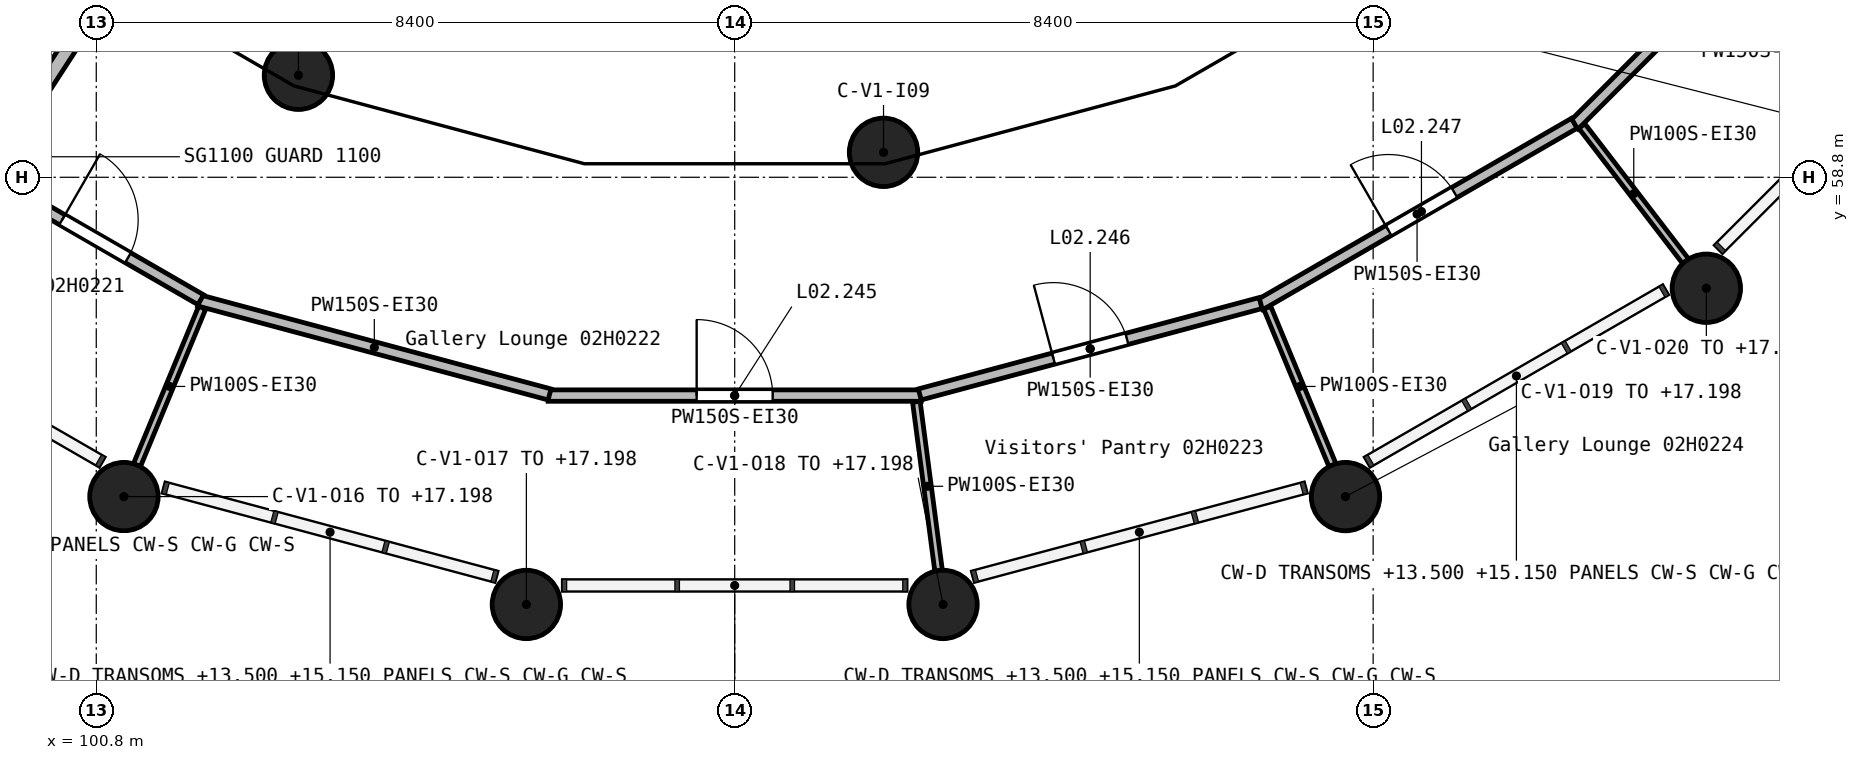
"""IFC4 building model, lengths in metres.
Left out: names, types, materials, properties, quantities, classifications, styles, units other than length and angle.
Written with IfcOpenShell. Run it as: python <this file> out.ifc"""

import sys

from ifc_helpers import new_model, si_unit, direction, frame, frame_2d, origin, origin_2d, place, context, subcontext, project, spatial, rectangle, circle, extrude, element, fill, save


model = new_model("IFC4")
c1 = context("Model", 3, precision=1e-05, world=origin(), true_north=direction((0.0, 1.0)))
c2 = subcontext(c1, "Body", "Model", "MODEL_VIEW")
j1 = project(units=[si_unit("LENGTHUNIT", "METRE"), si_unit("PLANEANGLEUNIT", "RADIAN")], contexts=[c1])
p1 = place(None, origin())
s1 = spatial("IfcSite", under=j1, at=p1, CompositionType="ELEMENT")
p2 = place(p1, origin())
s2 = spatial("IfcBuilding", under=s1, at=p2, CompositionType="ELEMENT")
p3 = place(p2, frame((0.0, 0.0, 12.6)))
s3 = spatial("IfcBuildingStorey", under=s2, at=p3, CompositionType="ELEMENT", Elevation=12.6)
p4 = place(p3, frame((101.164, 54.599, 0.0), z_axis=(0.0, 0.0, 1.0), x_axis=(1.0, 0.0, 0.0)))
e1 = element("IfcColumn", 1, at=p4, inside=s3, PredefinedType="COLUMN", context=c2, shape_type="SweptSolid", body=[
    extrude(circle(Radius=0.45, at=origin_2d()), origin(), (0.0, 0.0, 1.0), 4.598),
])
p5 = place(p3, frame((103.46, 60.142, 0.0), z_axis=(0.0, 0.0, 1.0), x_axis=(1.0, 0.0, 0.0)))
e2 = element("IfcColumn", 2, at=p5, inside=s3, PredefinedType="COLUMN", context=c2, shape_type="SweptSolid", body=[
    extrude(circle(Radius=0.45, at=origin_2d()), origin(), (0.0, 0.0, 1.0), 4.2),
])
p6 = place(p3, frame((106.459, 53.18, 0.0), z_axis=(0.0, 0.0, 1.0), x_axis=(1.0, 0.0, 0.0)))
e3 = element("IfcColumn", 3, at=p6, inside=s3, PredefinedType="COLUMN", context=c2, shape_type="SweptSolid", body=[
    extrude(circle(Radius=0.45, at=origin_2d()), origin(), (0.0, 0.0, 1.0), 4.598),
])
p7 = place(p3, frame((111.158, 59.128, 0.0), z_axis=(0.0, 0.0, 1.0), x_axis=(1.0, 0.0, 0.0)))
e4 = element("IfcColumn", 4, at=p7, inside=s3, PredefinedType="COLUMN", context=c2, shape_type="SweptSolid", body=[
    extrude(circle(Radius=0.45, at=origin_2d()), origin(), (0.0, 0.0, 1.0), 4.2),
])
for number, where, z_axis, x_axis in (
    (5, (111.941, 53.18, 0.0), (0.0, 0.0, 1.0), (1.0, 0.0, 0.0)),
    (6, (117.236, 54.599, 0.0), (0.0, 0.0, 1.0), (1.0, 0.0, 0.0)),
    (7, (121.984, 57.34, 0.0), (0.0, 0.0, 1.0), (1.0, 0.0, 0.0)),
):
    element("IfcColumn", number, at=place(p3, frame(where, z_axis=z_axis, x_axis=x_axis)), inside=s3, PredefinedType="COLUMN", context=c2, shape_type="SweptSolid", body=[
        extrude(circle(Radius=0.45, at=origin_2d()), origin(), (0.0, 0.0, 1.0), 4.598),
    ])
p8 = place(p3, frame((99.709, 59.386, 0.0), z_axis=(0.0, 0.0, 1.0), x_axis=(0.544553338247, 0.838726213853, 0.0)))
e8 = element("IfcWall", 8, at=p8, inside=s3, PredefinedType="SOLIDWALL", context=c2, shape_type="SweptSolid", body=[
    extrude(rectangle(XDim=2.525, YDim=0.2, at=frame_2d((1.263, 0.0))), origin(), (0.0, 0.0, 1.0), 3.85),
])
p9 = place(p3, frame((106.745, 55.928, 0.0), z_axis=(0.0, 0.0, 1.0), x_axis=(1.0, 0.0, 0.0)))
e9 = element("IfcWall", 9, at=p9, inside=s3, PredefinedType="PARTITIONING", context=c2, shape_type="SweptSolid", body=[
    extrude(rectangle(XDim=4.909, YDim=0.15, at=frame_2d((2.455, 0.0))), origin(), (0.0, 0.0, 1.0), 3.85),
])
p10 = place(p9, frame((1.955, 0.0, 0.0)))
e10 = element("IfcOpeningElement", 10, at=p10, cuts=e9, PredefinedType="OPENING", context=c2, shape_type="SweptSolid", body=[
    extrude(rectangle(XDim=1.0, YDim=2.1, at=frame_2d((0.5, 1.05))), frame((0.0, 0.085, 0.0), z_axis=(0.0, -1.0, 0.0), x_axis=(1.0, 0.0, 0.0)), (0.0, 0.0, 1.0), 0.17),
])
p11 = place(p3, frame((120.243, 59.486, 0.0), z_axis=(0.0, 0.0, 1.0), x_axis=(0.707131648229, 0.70708191327, 0.0)))
e11 = element("IfcWall", 11, at=p11, inside=s3, PredefinedType="PARTITIONING", context=c2, shape_type="SweptSolid", body=[
    extrude(rectangle(XDim=4.909, YDim=0.15, at=frame_2d((2.455, 0.0))), origin(), (0.0, 0.0, 1.0), 3.85),
])
p12 = place(p11, frame((1.954, 0.0, 0.0)))
e12 = element("IfcOpeningElement", 12, at=p12, cuts=e11, PredefinedType="OPENING", context=c2, shape_type="SweptSolid", body=[
    extrude(rectangle(XDim=1.0, YDim=2.1, at=frame_2d((0.5, 1.05))), frame((0.0, 0.085, 0.0), z_axis=(0.0, -1.0, 0.0), x_axis=(1.0, 0.0, 0.0)), (0.0, 0.0, 1.0), 0.17),
])
p13 = place(p3, frame((116.11, 57.123, 0.0), z_axis=(0.0, 0.0, 1.0), x_axis=(0.866054481515, 0.499949632511, 0.0)))
e13 = element("IfcWall", 13, at=p13, inside=s3, PredefinedType="PARTITIONING", context=c2, shape_type="SweptSolid", body=[
    extrude(rectangle(XDim=4.775, YDim=0.15, at=frame_2d((2.388, 0.0))), origin(), (0.0, 0.0, 1.0), 3.85),
])
p14 = place(p13, frame((1.954, 0.0, 0.0)))
e14 = element("IfcOpeningElement", 14, at=p14, cuts=e13, PredefinedType="OPENING", context=c2, shape_type="SweptSolid", body=[
    extrude(rectangle(XDim=1.0, YDim=2.1, at=frame_2d((0.5, 1.05))), frame((0.0, 0.085, 0.0), z_axis=(0.0, -1.0, 0.0), x_axis=(1.0, 0.0, 0.0)), (0.0, 0.0, 1.0), 0.17),
])
p15 = place(p3, frame((111.635, 55.943, 0.0), z_axis=(0.0, 0.0, 1.0), x_axis=(0.965901562331, 0.258909582454, 0.0)))
e15 = element("IfcWall", 15, at=p15, inside=s3, PredefinedType="PARTITIONING", context=c2, shape_type="SweptSolid", body=[
    extrude(rectangle(XDim=4.642, YDim=0.15, at=frame_2d((2.321, 0.0))), origin(), (0.0, 0.0, 1.0), 3.85),
])
p16 = place(p15, frame((1.821, 0.0, 0.0)))
e16 = element("IfcOpeningElement", 16, at=p16, cuts=e15, PredefinedType="OPENING", context=c2, shape_type="SweptSolid", body=[
    extrude(rectangle(XDim=1.0, YDim=2.1, at=frame_2d((0.5, 1.05))), frame((0.0, 0.085, 0.0), z_axis=(0.0, -1.0, 0.0), x_axis=(1.0, 0.0, 0.0)), (0.0, 0.0, 1.0), 0.17),
])
p17 = place(p3, frame((102.153, 57.179, 0.0), z_axis=(0.0, 0.0, 1.0), x_axis=(0.965887773881, -0.258961016886, 0.0)))
e17 = element("IfcWall", 17, at=p17, inside=s3, PredefinedType="PARTITIONING", context=c2, shape_type="SweptSolid", body=[
    extrude(rectangle(XDim=4.774, YDim=0.15, at=frame_2d((2.387, 0.0))), origin(), (0.0, 0.0, 1.0), 3.85),
])
p18 = place(p3, frame((99.499, 58.733, 0.0), z_axis=(0.0, 0.0, 1.0), x_axis=(0.866085584755, -0.499895749011, 0.0)))
e18 = element("IfcWall", 18, at=p18, inside=s3, PredefinedType="PARTITIONING", context=c2, shape_type="SweptSolid", body=[
    extrude(rectangle(XDim=3.09, YDim=0.15, at=frame_2d((1.545, 0.0))), origin(), (0.0, 0.0, 1.0), 3.85),
])
p19 = place(p18, frame((0.984, 0.0, 0.0)))
e19 = element("IfcOpeningElement", 19, at=p19, cuts=e18, PredefinedType="OPENING", context=c2, shape_type="SweptSolid", body=[
    extrude(rectangle(XDim=1.0, YDim=2.1, at=frame_2d((0.5, 1.05))), frame((0.0, 0.085, 0.0), z_axis=(0.0, -1.0, 0.0), x_axis=(1.0, 0.0, 0.0)), (0.0, 0.0, 1.0), 0.17),
])
p20 = place(p3, frame((120.346, 59.474, 0.0), z_axis=(0.0, 0.0, 1.0), x_axis=(0.608947804402, -0.793210294635, 0.0)))
e20 = element("IfcWall", 20, at=p20, inside=s3, PredefinedType="PARTITIONING", context=c2, shape_type="SweptSolid", body=[
    extrude(rectangle(XDim=2.243, YDim=0.1, at=frame_2d((1.122, 0.0))), origin(), (0.0, 0.0, 1.0), 3.85),
])
p21 = place(p3, frame((116.206, 57.084, 0.0), z_axis=(0.0, 0.0, 1.0), x_axis=(0.382829249812, -0.923819119465, 0.0)))
e21 = element("IfcWall", 21, at=p21, inside=s3, PredefinedType="PARTITIONING", context=c2, shape_type="SweptSolid", body=[
    extrude(rectangle(XDim=2.243, YDim=0.1, at=frame_2d((1.122, 0.0))), origin(), (0.0, 0.0, 1.0), 3.85),
])
p22 = place(p3, frame((101.335, 55.012, 0.0), z_axis=(0.0, 0.0, 1.0), x_axis=(0.382736345947, 0.923857613213, 0.0)))
e22 = element("IfcWall", 22, at=p22, inside=s3, PredefinedType="PARTITIONING", context=c2, shape_type="SweptSolid", body=[
    extrude(rectangle(XDim=2.243, YDim=0.1, at=frame_2d((1.121, 0.0))), origin(), (0.0, 0.0, 1.0), 3.85),
])
p23 = place(p3, frame((111.59, 55.847, 0.0), z_axis=(0.0, 0.0, 1.0), x_axis=(0.13062345865, -0.991432051151, 0.0)))
e23 = element("IfcWall", 23, at=p23, inside=s3, PredefinedType="PARTITIONING", context=c2, shape_type="SweptSolid", body=[
    extrude(rectangle(XDim=2.243, YDim=0.1, at=frame_2d((1.122, 0.0))), origin(), (0.0, 0.0, 1.0), 3.85),
])
p24 = place(p19, frame((1.0, 0.0, 0.0), z_axis=(0.0, 0.0, 1.0), x_axis=(-1.0, 0.0, 0.0)))
e24 = element("IfcDoor", 24, at=p24, inside=s3, OperationType="SINGLE_SWING_RIGHT", PredefinedType="DOOR", context=c2, shape_type="SweptSolid", body=[
    extrude(rectangle(XDim=1.0, YDim=2.1, at=frame_2d((0.5, 1.05))), frame((0.0, 0.025, 0.0), z_axis=(0.0, -1.0, 0.0), x_axis=(1.0, 0.0, 0.0)), (0.0, 0.0, 1.0), 0.05),
])
fill(e19, e24)
p25 = place(p10, frame((1.0, 0.0, 0.0), z_axis=(0.0, 0.0, 1.0), x_axis=(-1.0, 0.0, 0.0)))
e25 = element("IfcDoor", 25, at=p25, inside=s3, OperationType="SINGLE_SWING_RIGHT", PredefinedType="DOOR", context=c2, shape_type="SweptSolid", body=[
    extrude(rectangle(XDim=1.0, YDim=2.1, at=frame_2d((0.5, 1.05))), frame((0.0, 0.025, 0.0), z_axis=(0.0, -1.0, 0.0), x_axis=(1.0, 0.0, 0.0)), (0.0, 0.0, 1.0), 0.05),
])
fill(e10, e25)
p26 = place(p16, frame((1.0, 0.0, 0.0), z_axis=(0.0, 0.0, 1.0), x_axis=(-1.0, 0.0, 0.0)))
e26 = element("IfcDoor", 26, at=p26, inside=s3, OperationType="SINGLE_SWING_LEFT", PredefinedType="DOOR", context=c2, shape_type="SweptSolid", body=[
    extrude(rectangle(XDim=1.0, YDim=2.1, at=frame_2d((0.5, 1.05))), frame((0.0, 0.025, 0.0), z_axis=(0.0, -1.0, 0.0), x_axis=(1.0, 0.0, 0.0)), (0.0, 0.0, 1.0), 0.05),
])
fill(e16, e26)
p27 = place(p14, frame((1.0, 0.0, 0.0), z_axis=(0.0, 0.0, 1.0), x_axis=(-1.0, 0.0, 0.0)))
e27 = element("IfcDoor", 27, at=p27, inside=s3, OperationType="SINGLE_SWING_LEFT", PredefinedType="DOOR", context=c2, shape_type="SweptSolid", body=[
    extrude(rectangle(XDim=1.0, YDim=2.1, at=frame_2d((0.5, 1.05))), frame((0.0, 0.025, 0.0), z_axis=(0.0, -1.0, 0.0), x_axis=(1.0, 0.0, 0.0)), (0.0, 0.0, 1.0), 0.05),
])
fill(e14, e27)
save(model, sys.argv[1])
